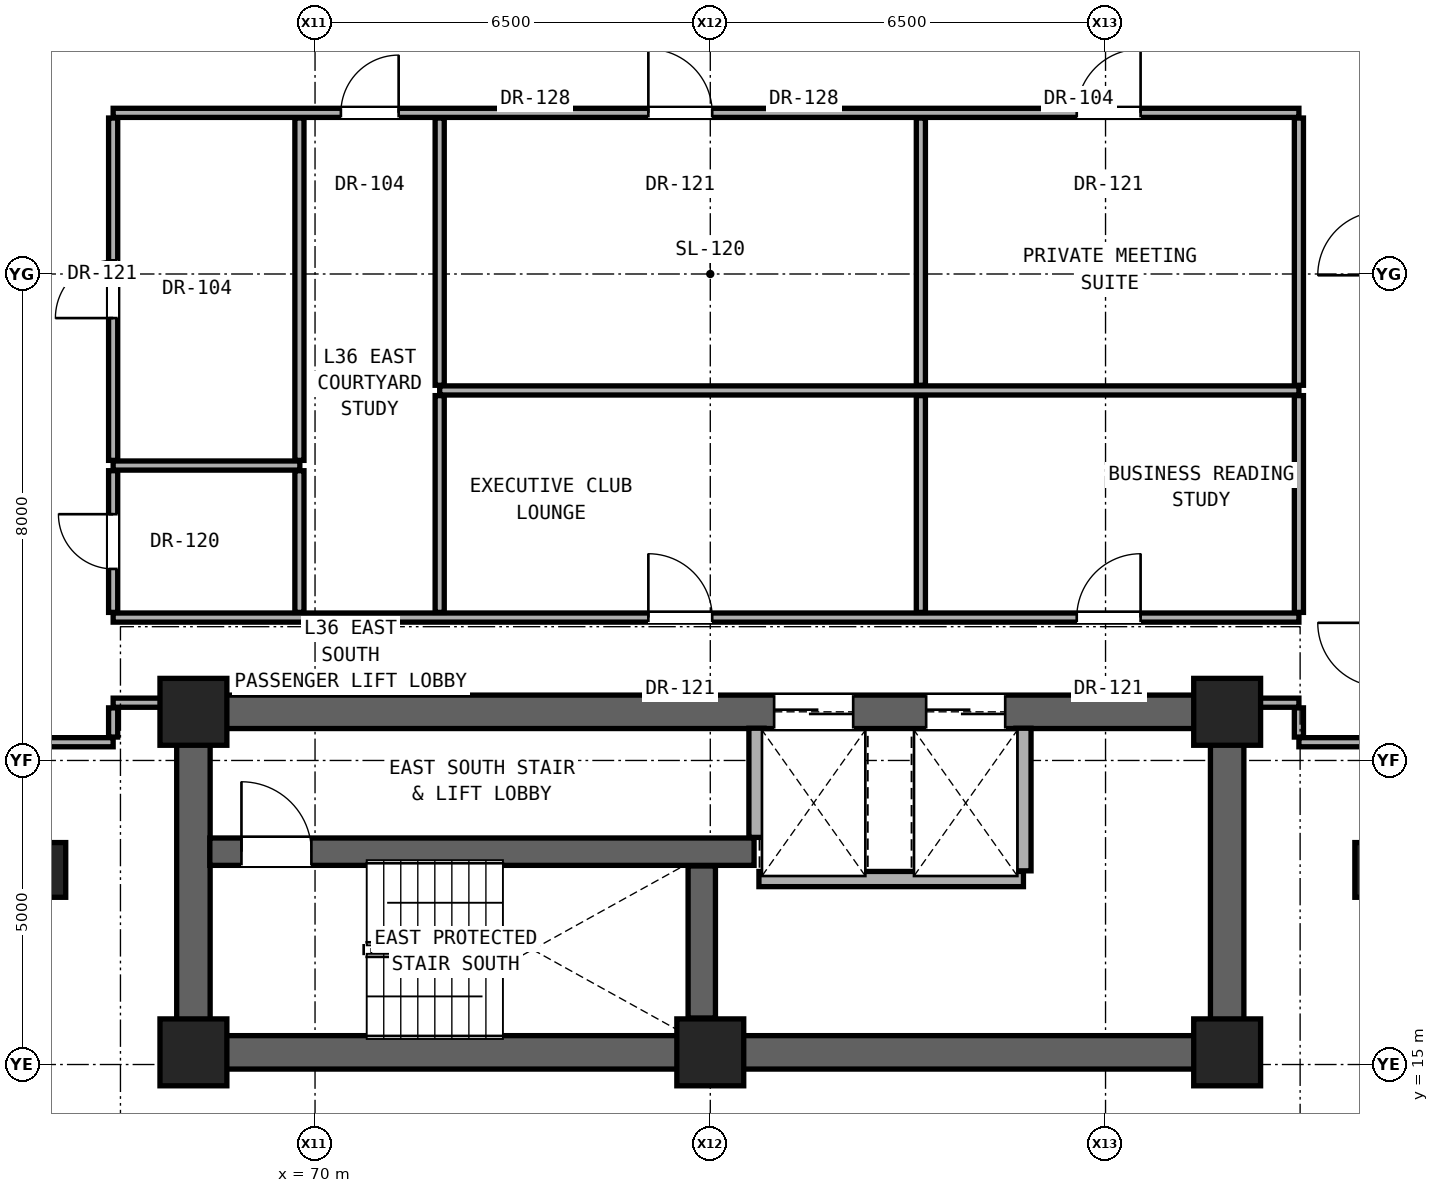
"""IFC4 building model, lengths in metres.
Left out: names, types, materials, properties, quantities, classifications, styles, units other than length and angle.
Written with IfcOpenShell. Run it as: python <this file> out.ifc"""

import sys

from ifc_helpers import new_model, si_unit, direction, frame, frame_2d, origin, origin_2d, place, context, subcontext, project, spatial, rectangle, extrude, element, fill, save


model = new_model("IFC4")
c1 = context("Model", 3, precision=1e-05, world=origin(), true_north=direction((0.0, 1.0)))
c2 = subcontext(c1, "Body", "Model", "MODEL_VIEW")
j1 = project(units=[si_unit("LENGTHUNIT", "METRE"), si_unit("PLANEANGLEUNIT", "RADIAN")], contexts=[c1])
p1 = place(None, origin())
s1 = spatial("IfcSite", under=j1, at=p1, CompositionType="ELEMENT")
p2 = place(p1, origin())
s2 = spatial("IfcBuilding", under=s1, at=p2, CompositionType="ELEMENT")
p3 = place(p2, frame((0.0, 0.0, 128.0)))
s3 = spatial("IfcBuildingStorey", under=s2, at=p3, CompositionType="ELEMENT", Elevation=128.0)
for number, where, z_axis, x_axis in (
    (1, (68.0, 15.2, 0.0), (0.0, 0.0, 1.0), (1.0, 0.0, 0.0)),
    (2, (76.5, 15.2, 0.0), (0.0, 0.0, 1.0), (1.0, 0.0, 0.0)),
    (3, (85.0, 15.2, 0.0), (0.0, 0.0, 1.0), (1.0, 0.0, 0.0)),
    (4, (68.0, 20.8, 0.0), (0.0, 0.0, 1.0), (1.0, 0.0, 0.0)),
    (5, (85.0, 20.8, 0.0), (0.0, 0.0, 1.0), (1.0, 0.0, 0.0)),
):
    element("IfcColumn", number, at=place(p3, frame(where, z_axis=z_axis, x_axis=x_axis)), inside=s3, PredefinedType="COLUMN", context=c2, shape_type="SweptSolid", body=[
        extrude(rectangle(XDim=1.1, YDim=1.1, at=origin_2d()), origin(), (0.0, 0.0, 1.0), 3.3),
    ])
for number, where, z_axis, x_axis in (
    (6, (65.6, 18.2, 0.0), (0.0, 0.0, 1.0), (1.0, 0.0, 0.0)),
    (7, (87.4, 18.2, 0.0), (0.0, 0.0, 1.0), (1.0, 0.0, 0.0)),
):
    element("IfcColumn", number, at=place(p3, frame(where, z_axis=z_axis, x_axis=x_axis)), inside=s3, PredefinedType="PILASTER", context=c2, shape_type="SweptSolid", body=[
        extrude(rectangle(XDim=0.6, YDim=0.9, at=origin_2d()), origin(), (0.0, 0.0, 1.0), 3.3),
    ])
p4 = place(p3, frame((68.0, 15.2, 0.0), z_axis=(0.0, 0.0, 1.0), x_axis=(1.0, 0.0, 0.0)))
e8 = element("IfcWall", 8, at=p4, inside=s3, PredefinedType="SHEAR", context=c2, shape_type="SweptSolid", body=[
    extrude(rectangle(XDim=17.0, YDim=0.55, at=frame_2d((8.5, 0.0))), origin(), (0.0, 0.0, 1.0), 3.08),
])
for number, where, z_axis, x_axis in (
    (9, (68.0, 15.2, 0.0), (0.0, 0.0, 1.0), (0.0, 1.0, 0.0)),
    (10, (85.0, 15.2, 0.0), (0.0, 0.0, 1.0), (0.0, 1.0, 0.0)),
):
    element("IfcWall", number, at=place(p3, frame(where, z_axis=z_axis, x_axis=x_axis)), inside=s3, PredefinedType="SHEAR", context=c2, shape_type="SweptSolid", body=[
        extrude(rectangle(XDim=5.6, YDim=0.55, at=frame_2d((2.8, 0.0))), origin(), (0.0, 0.0, 1.0), 3.08),
    ])
p5 = place(p3, frame((68.0, 20.8, 0.0), z_axis=(0.0, 0.0, 1.0), x_axis=(1.0, 0.0, 0.0)))
e11 = element("IfcWall", 11, at=p5, inside=s3, PredefinedType="SHEAR", context=c2, shape_type="SweptSolid", body=[
    extrude(rectangle(XDim=17.0, YDim=0.55, at=frame_2d((8.5, 0.0))), origin(), (0.0, 0.0, 1.0), 3.08),
])
p6 = place(p5, frame((9.55, 0.0, 0.0)))
e12 = element("IfcOpeningElement", 12, at=p6, cuts=e11, PredefinedType="OPENING", context=c2, shape_type="SweptSolid", body=[
    extrude(rectangle(XDim=1.3, YDim=2.3, at=frame_2d((0.65, 1.15))), frame((0.0, 0.285, 0.0), z_axis=(0.0, -1.0, 0.0), x_axis=(1.0, 0.0, 0.0)), (0.0, 0.0, 1.0), 0.57),
])
p7 = place(p5, frame((12.05, 0.0, 0.0)))
e13 = element("IfcOpeningElement", 13, at=p7, cuts=e11, PredefinedType="OPENING", context=c2, shape_type="SweptSolid", body=[
    extrude(rectangle(XDim=1.3, YDim=2.3, at=frame_2d((0.65, 1.15))), frame((0.0, 0.285, 0.0), z_axis=(0.0, -1.0, 0.0), x_axis=(1.0, 0.0, 0.0)), (0.0, 0.0, 1.0), 0.57),
])
p8 = place(p3, frame((77.3, 18.05, 0.0), z_axis=(0.0, 0.0, 1.0), x_axis=(1.0, 0.0, 0.0)))
e14 = element("IfcWall", 14, at=p8, inside=s3, PredefinedType="SOLIDWALL", context=c2, shape_type="SweptSolid", body=[
    extrude(rectangle(XDim=4.35, YDim=0.25, at=frame_2d((2.175, 0.0))), origin(), (0.0, 0.0, 1.0), 3.08),
])
p9 = place(p3, frame((68.27, 18.5, 0.0), z_axis=(0.0, 0.0, 1.0), x_axis=(1.0, 0.0, 0.0)))
e15 = element("IfcWall", 15, at=p9, inside=s3, PredefinedType="SHEAR", context=c2, shape_type="SweptSolid", body=[
    extrude(rectangle(XDim=8.95, YDim=0.45, at=frame_2d((4.475, 0.0))), origin(), (0.0, 0.0, 1.0), 3.08),
])
p10 = place(p9, frame((0.52, 0.0, 0.0)))
e16 = element("IfcOpeningElement", 16, at=p10, cuts=e15, PredefinedType="OPENING", context=c2, shape_type="SweptSolid", body=[
    extrude(rectangle(XDim=1.15, YDim=2.2, at=frame_2d((0.575, 1.1))), frame((0.0, 0.235, 0.0), z_axis=(0.0, -1.0, 0.0), x_axis=(1.0, 0.0, 0.0)), (0.0, 0.0, 1.0), 0.47),
])
p11 = place(p3, frame((65.32, 20.3, 0.0), z_axis=(0.0, 0.0, 1.0), x_axis=(1.0, 0.0, 0.0)))
e17 = element("IfcWall", 17, at=p11, inside=s3, PredefinedType="PARTITIONING", context=c2, shape_type="SweptSolid", body=[
    extrude(rectangle(XDim=1.36, YDim=0.15, at=frame_2d((0.68, 0.0))), origin(), (0.0, 0.0, 1.0), 3.08),
])
p12 = place(p3, frame((86.18, 20.3, 0.0), z_axis=(0.0, 0.0, 1.0), x_axis=(1.0, 0.0, 0.0)))
e18 = element("IfcWall", 18, at=p12, inside=s3, PredefinedType="PARTITIONING", context=c2, shape_type="SweptSolid", body=[
    extrude(rectangle(XDim=1.36, YDim=0.15, at=frame_2d((0.68, 0.0))), origin(), (0.0, 0.0, 1.0), 3.08),
])
p13 = place(p3, frame((66.68, 20.95, 0.0), z_axis=(0.0, 0.0, 1.0), x_axis=(1.0, 0.0, 0.0)))
e19 = element("IfcWall", 19, at=p13, inside=s3, PredefinedType="PARTITIONING", context=c2, shape_type="SweptSolid", body=[
    extrude(rectangle(XDim=1.05, YDim=0.15, at=frame_2d((0.525, 0.0))), origin(), (0.0, 0.0, 1.0), 2.472),
])
p14 = place(p3, frame((85.27, 20.95, 0.0), z_axis=(0.0, 0.0, 1.0), x_axis=(1.0, 0.0, 0.0)))
e20 = element("IfcWall", 20, at=p14, inside=s3, PredefinedType="PARTITIONING", context=c2, shape_type="SweptSolid", body=[
    extrude(rectangle(XDim=0.91, YDim=0.15, at=frame_2d((0.455, 0.0))), origin(), (0.0, 0.0, 1.0), 2.472),
])
p15 = place(p3, frame((66.68, 22.35, 0.0), z_axis=(0.0, 0.0, 1.0), x_axis=(1.0, 0.0, 0.0)))
e21 = element("IfcWall", 21, at=p15, inside=s3, PredefinedType="PARTITIONING", context=c2, shape_type="SweptSolid", body=[
    extrude(rectangle(XDim=19.5, YDim=0.15, at=frame_2d((9.75, 0.0))), origin(), (0.0, 0.0, 1.0), 2.216),
])
p16 = place(p15, frame((8.802, 0.0, 0.0)))
e22 = element("IfcOpeningElement", 22, at=p16, cuts=e21, PredefinedType="OPENING", context=c2, shape_type="SweptSolid", body=[
    extrude(rectangle(XDim=1.05, YDim=2.2, at=frame_2d((0.525, 1.1))), frame((0.0, 0.085, 0.0), z_axis=(0.0, -1.0, 0.0), x_axis=(1.0, 0.0, 0.0)), (0.0, 0.0, 1.0), 0.17),
])
p17 = place(p15, frame((15.846, 0.0, 0.0)))
e23 = element("IfcOpeningElement", 23, at=p17, cuts=e21, PredefinedType="OPENING", context=c2, shape_type="SweptSolid", body=[
    extrude(rectangle(XDim=1.05, YDim=2.2, at=frame_2d((0.525, 1.1))), frame((0.0, 0.085, 0.0), z_axis=(0.0, -1.0, 0.0), x_axis=(1.0, 0.0, 0.0)), (0.0, 0.0, 1.0), 0.17),
])
p18 = place(p3, frame((66.68, 24.85, 0.0), z_axis=(0.0, 0.0, 1.0), x_axis=(1.0, 0.0, 0.0)))
e24 = element("IfcWall", 24, at=p18, inside=s3, PredefinedType="PARTITIONING", context=c2, shape_type="SweptSolid", body=[
    extrude(rectangle(XDim=3.07, YDim=0.15, at=frame_2d((1.535, 0.0))), origin(), (0.0, 0.0, 1.0), 2.216),
])
p19 = place(p3, frame((72.05, 26.085, 0.0), z_axis=(0.0, 0.0, 1.0), x_axis=(1.0, 0.0, 0.0)))
e25 = element("IfcWall", 25, at=p19, inside=s3, PredefinedType="PARTITIONING", context=c2, shape_type="SweptSolid", body=[
    extrude(rectangle(XDim=14.13, YDim=0.15, at=frame_2d((7.065, 0.0))), origin(), (0.0, 0.0, 1.0), 2.216),
])
p20 = place(p3, frame((66.68, 30.65, 0.0), z_axis=(0.0, 0.0, 1.0), x_axis=(1.0, 0.0, 0.0)))
e26 = element("IfcWall", 26, at=p20, inside=s3, PredefinedType="PARTITIONING", context=c2, shape_type="SweptSolid", body=[
    extrude(rectangle(XDim=19.5, YDim=0.15, at=frame_2d((9.75, 0.0))), origin(), (0.0, 0.0, 1.0), 2.216),
])
p21 = place(p20, frame((3.745, 0.0, 0.0)))
e27 = element("IfcOpeningElement", 27, at=p21, cuts=e26, PredefinedType="OPENING", context=c2, shape_type="SweptSolid", body=[
    extrude(rectangle(XDim=0.95, YDim=2.15, at=frame_2d((0.475, 1.075))), frame((0.0, 0.085, 0.0), z_axis=(0.0, -1.0, 0.0), x_axis=(1.0, 0.0, 0.0)), (0.0, 0.0, 1.0), 0.17),
])
p22 = place(p20, frame((8.802, 0.0, 0.0)))
e28 = element("IfcOpeningElement", 28, at=p22, cuts=e26, PredefinedType="OPENING", context=c2, shape_type="SweptSolid", body=[
    extrude(rectangle(XDim=1.05, YDim=2.2, at=frame_2d((0.525, 1.1))), frame((0.0, 0.085, 0.0), z_axis=(0.0, -1.0, 0.0), x_axis=(1.0, 0.0, 0.0)), (0.0, 0.0, 1.0), 0.17),
])
p23 = place(p20, frame((15.846, 0.0, 0.0)))
e29 = element("IfcOpeningElement", 29, at=p23, cuts=e26, PredefinedType="OPENING", context=c2, shape_type="SweptSolid", body=[
    extrude(rectangle(XDim=1.05, YDim=2.2, at=frame_2d((0.525, 1.1))), frame((0.0, 0.085, 0.0), z_axis=(0.0, -1.0, 0.0), x_axis=(1.0, 0.0, 0.0)), (0.0, 0.0, 1.0), 0.17),
])
p24 = place(p3, frame((66.68, 20.385, 0.0), z_axis=(0.0, 0.0, 1.0), x_axis=(0.0, 1.0, 0.0)))
e30 = element("IfcWall", 30, at=p24, inside=s3, PredefinedType="PARTITIONING", context=c2, shape_type="SweptSolid", body=[
    extrude(rectangle(XDim=0.48, YDim=0.15, at=frame_2d((0.24, 0.0))), origin(), (0.0, 0.0, 1.0), 2.472),
])
p25 = place(p3, frame((66.68, 22.435, 0.0), z_axis=(0.0, 0.0, 1.0), x_axis=(0.0, 1.0, 0.0)))
e31 = element("IfcWall", 31, at=p25, inside=s3, PredefinedType="PARTITIONING", context=c2, shape_type="SweptSolid", body=[
    extrude(rectangle(XDim=2.33, YDim=0.15, at=frame_2d((1.165, 0.0))), origin(), (0.0, 0.0, 1.0), 3.08),
])
p26 = place(p25, frame((0.715, 0.0, 0.0)))
e32 = element("IfcOpeningElement", 32, at=p26, cuts=e31, PredefinedType="OPENING", context=c2, shape_type="SweptSolid", body=[
    extrude(rectangle(XDim=0.9, YDim=2.1, at=frame_2d((0.45, 1.05))), frame((0.0, 0.085, 0.0), z_axis=(0.0, -1.0, 0.0), x_axis=(1.0, 0.0, 0.0)), (0.0, 0.0, 1.0), 0.17),
])
p27 = place(p3, frame((66.68, 24.935, 0.0), z_axis=(0.0, 0.0, 1.0), x_axis=(0.0, 1.0, 0.0)))
e33 = element("IfcWall", 33, at=p27, inside=s3, PredefinedType="PARTITIONING", context=c2, shape_type="SweptSolid", body=[
    extrude(rectangle(XDim=5.63, YDim=0.15, at=frame_2d((2.815, 0.0))), origin(), (0.0, 0.0, 1.0), 2.376),
])
p28 = place(p27, frame((2.34, 0.0, 0.0)))
e34 = element("IfcOpeningElement", 34, at=p28, cuts=e33, PredefinedType="OPENING", context=c2, shape_type="SweptSolid", body=[
    extrude(rectangle(XDim=0.95, YDim=2.15, at=frame_2d((0.475, 1.075))), frame((0.0, 0.085, 0.0), z_axis=(0.0, -1.0, 0.0), x_axis=(1.0, 0.0, 0.0)), (0.0, 0.0, 1.0), 0.17),
])
p29 = place(p3, frame((69.743, 22.435, 0.0), z_axis=(0.0, 0.0, 1.0), x_axis=(0.0, 1.0, 0.0)))
e35 = element("IfcWall", 35, at=p29, inside=s3, PredefinedType="PARTITIONING", context=c2, shape_type="SweptSolid", body=[
    extrude(rectangle(XDim=2.33, YDim=0.15, at=frame_2d((1.165, 0.0))), origin(), (0.0, 0.0, 1.0), 3.08),
])
p30 = place(p3, frame((69.743, 24.935, 0.0), z_axis=(0.0, 0.0, 1.0), x_axis=(0.0, 1.0, 0.0)))
e36 = element("IfcWall", 36, at=p30, inside=s3, PredefinedType="PARTITIONING", context=c2, shape_type="SweptSolid", body=[
    extrude(rectangle(XDim=5.63, YDim=0.15, at=frame_2d((2.815, 0.0))), origin(), (0.0, 0.0, 1.0), 2.216),
])
p31 = place(p3, frame((72.05, 22.435, 0.0), z_axis=(0.0, 0.0, 1.0), x_axis=(0.0, 1.0, 0.0)))
e37 = element("IfcWall", 37, at=p31, inside=s3, PredefinedType="PARTITIONING", context=c2, shape_type="SweptSolid", body=[
    extrude(rectangle(XDim=3.565, YDim=0.15, at=frame_2d((1.782, 0.0))), origin(), (0.0, 0.0, 1.0), 3.08),
])
p32 = place(p3, frame((72.05, 26.17, 0.0), z_axis=(0.0, 0.0, 1.0), x_axis=(0.0, 1.0, 0.0)))
e38 = element("IfcWall", 38, at=p32, inside=s3, PredefinedType="PARTITIONING", context=c2, shape_type="SweptSolid", body=[
    extrude(rectangle(XDim=4.395, YDim=0.15, at=frame_2d((2.198, 0.0))), origin(), (0.0, 0.0, 1.0), 2.216),
])
p33 = place(p3, frame((76.36, 15.765, 0.0), z_axis=(0.0, 0.0, 1.0), x_axis=(0.0, 1.0, 0.0)))
e39 = element("IfcWall", 39, at=p33, inside=s3, PredefinedType="SHEAR", context=c2, shape_type="SweptSolid", body=[
    extrude(rectangle(XDim=2.5, YDim=0.45, at=frame_2d((1.25, 0.0))), origin(), (0.0, 0.0, 1.0), 3.08),
])
p34 = place(p3, frame((77.26, 18.735, 0.0), z_axis=(0.0, 0.0, 1.0), x_axis=(0.0, 1.0, 0.0)))
e40 = element("IfcWall", 40, at=p34, inside=s3, PredefinedType="SOLIDWALL", context=c2, shape_type="SweptSolid", body=[
    extrude(rectangle(XDim=1.795, YDim=0.25, at=frame_2d((0.897, 0.0))), origin(), (0.0, 0.0, 1.0), 3.08),
])
p35 = place(p3, frame((79.963, 22.435, 0.0), z_axis=(0.0, 0.0, 1.0), x_axis=(0.0, 1.0, 0.0)))
e41 = element("IfcWall", 41, at=p35, inside=s3, PredefinedType="PARTITIONING", context=c2, shape_type="SweptSolid", body=[
    extrude(rectangle(XDim=3.565, YDim=0.15, at=frame_2d((1.782, 0.0))), origin(), (0.0, 0.0, 1.0), 3.08),
])
p36 = place(p3, frame((79.963, 26.17, 0.0), z_axis=(0.0, 0.0, 1.0), x_axis=(0.0, 1.0, 0.0)))
e42 = element("IfcWall", 42, at=p36, inside=s3, PredefinedType="PARTITIONING", context=c2, shape_type="SweptSolid", body=[
    extrude(rectangle(XDim=4.395, YDim=0.15, at=frame_2d((2.198, 0.0))), origin(), (0.0, 0.0, 1.0), 2.216),
])
p37 = place(p3, frame((81.65, 18.185, 0.0), z_axis=(0.0, 0.0, 1.0), x_axis=(0.0, 1.0, 0.0)))
e43 = element("IfcWall", 43, at=p37, inside=s3, PredefinedType="SOLIDWALL", context=c2, shape_type="SweptSolid", body=[
    extrude(rectangle(XDim=2.345, YDim=0.25, at=frame_2d((1.172, 0.0))), origin(), (0.0, 0.0, 1.0), 3.08),
])
p38 = place(p3, frame((86.18, 20.385, 0.0), z_axis=(0.0, 0.0, 1.0), x_axis=(0.0, 1.0, 0.0)))
e44 = element("IfcWall", 44, at=p38, inside=s3, PredefinedType="PARTITIONING", context=c2, shape_type="SweptSolid", body=[
    extrude(rectangle(XDim=0.48, YDim=0.15, at=frame_2d((0.24, 0.0))), origin(), (0.0, 0.0, 1.0), 2.472),
])
p39 = place(p3, frame((86.18, 22.435, 0.0), z_axis=(0.0, 0.0, 1.0), x_axis=(0.0, 1.0, 0.0)))
e45 = element("IfcWall", 45, at=p39, inside=s3, PredefinedType="PARTITIONING", context=c2, shape_type="SweptSolid", body=[
    extrude(rectangle(XDim=3.565, YDim=0.15, at=frame_2d((1.782, 0.0))), origin(), (0.0, 0.0, 1.0), 3.08),
])
p40 = place(p3, frame((86.18, 26.17, 0.0), z_axis=(0.0, 0.0, 1.0), x_axis=(0.0, 1.0, 0.0)))
e46 = element("IfcWall", 46, at=p40, inside=s3, PredefinedType="PARTITIONING", context=c2, shape_type="SweptSolid", body=[
    extrude(rectangle(XDim=4.395, YDim=0.15, at=frame_2d((2.198, 0.0))), origin(), (0.0, 0.0, 1.0), 2.376),
])
p41 = place(p10, origin())
e47 = element("IfcDoor", 47, at=p41, inside=s3, OperationType="SINGLE_SWING_LEFT", PredefinedType="DOOR", context=c2, shape_type="SweptSolid", body=[
    extrude(rectangle(XDim=1.15, YDim=2.2, at=frame_2d((0.575, 1.1))), frame((0.0, 0.025, 0.0), z_axis=(0.0, -1.0, 0.0), x_axis=(1.0, 0.0, 0.0)), (0.0, 0.0, 1.0), 0.05),
])
fill(e16, e47)
p42 = place(p26, origin())
e48 = element("IfcDoor", 48, at=p42, inside=s3, OperationType="SINGLE_SWING_RIGHT", PredefinedType="DOOR", context=c2, shape_type="SweptSolid", body=[
    extrude(rectangle(XDim=0.9, YDim=2.1, at=frame_2d((0.45, 1.05))), frame((0.0, 0.025, 0.0), z_axis=(0.0, -1.0, 0.0), x_axis=(1.0, 0.0, 0.0)), (0.0, 0.0, 1.0), 0.05),
])
fill(e32, e48)
p43 = place(p28, origin())
e49 = element("IfcDoor", 49, at=p43, inside=s3, OperationType="SINGLE_SWING_LEFT", PredefinedType="DOOR", context=c2, shape_type="SweptSolid", body=[
    extrude(rectangle(XDim=0.95, YDim=2.15, at=frame_2d((0.475, 1.075))), frame((0.0, 0.025, 0.0), z_axis=(0.0, -1.0, 0.0), x_axis=(1.0, 0.0, 0.0)), (0.0, 0.0, 1.0), 0.05),
])
fill(e34, e49)
p44 = place(p21, origin())
e50 = element("IfcDoor", 50, at=p44, inside=s3, OperationType="SINGLE_SWING_RIGHT", PredefinedType="DOOR", context=c2, shape_type="SweptSolid", body=[
    extrude(rectangle(XDim=0.95, YDim=2.15, at=frame_2d((0.475, 1.075))), frame((0.0, 0.025, 0.0), z_axis=(0.0, -1.0, 0.0), x_axis=(1.0, 0.0, 0.0)), (0.0, 0.0, 1.0), 0.05),
])
fill(e27, e50)
p45 = place(p16, origin())
e51 = element("IfcDoor", 51, at=p45, inside=s3, OperationType="SINGLE_SWING_LEFT", PredefinedType="DOOR", context=c2, shape_type="SweptSolid", body=[
    extrude(rectangle(XDim=1.05, YDim=2.2, at=frame_2d((0.525, 1.1))), frame((0.0, 0.025, 0.0), z_axis=(0.0, -1.0, 0.0), x_axis=(1.0, 0.0, 0.0)), (0.0, 0.0, 1.0), 0.05),
])
fill(e22, e51)
p46 = place(p17, origin())
e52 = element("IfcDoor", 52, at=p46, inside=s3, OperationType="SINGLE_SWING_RIGHT", PredefinedType="DOOR", context=c2, shape_type="SweptSolid", body=[
    extrude(rectangle(XDim=1.05, YDim=2.2, at=frame_2d((0.525, 1.1))), frame((0.0, 0.025, 0.0), z_axis=(0.0, -1.0, 0.0), x_axis=(1.0, 0.0, 0.0)), (0.0, 0.0, 1.0), 0.05),
])
fill(e23, e52)
p47 = place(p22, origin())
e53 = element("IfcDoor", 53, at=p47, inside=s3, OperationType="SINGLE_SWING_LEFT", PredefinedType="DOOR", context=c2, shape_type="SweptSolid", body=[
    extrude(rectangle(XDim=1.05, YDim=2.2, at=frame_2d((0.525, 1.1))), frame((0.0, 0.025, 0.0), z_axis=(0.0, -1.0, 0.0), x_axis=(1.0, 0.0, 0.0)), (0.0, 0.0, 1.0), 0.05),
])
fill(e28, e53)
p48 = place(p23, origin())
e54 = element("IfcDoor", 54, at=p48, inside=s3, OperationType="SINGLE_SWING_RIGHT", PredefinedType="DOOR", context=c2, shape_type="SweptSolid", body=[
    extrude(rectangle(XDim=1.05, YDim=2.2, at=frame_2d((0.525, 1.1))), frame((0.0, 0.025, 0.0), z_axis=(0.0, -1.0, 0.0), x_axis=(1.0, 0.0, 0.0)), (0.0, 0.0, 1.0), 0.05),
])
fill(e29, e54)
p49 = place(p6, origin())
e55 = element("IfcDoor", 55, at=p49, inside=s3, OperationType="DOUBLE_DOOR_SLIDING", PredefinedType="DOOR", context=c2, shape_type="SweptSolid", body=[
    extrude(rectangle(XDim=1.3, YDim=2.3, at=frame_2d((0.65, 1.15))), frame((0.0, 0.025, 0.0), z_axis=(0.0, -1.0, 0.0), x_axis=(1.0, 0.0, 0.0)), (0.0, 0.0, 1.0), 0.05),
])
fill(e12, e55)
p50 = place(p7, origin())
e56 = element("IfcDoor", 56, at=p50, inside=s3, OperationType="DOUBLE_DOOR_SLIDING", PredefinedType="DOOR", context=c2, shape_type="SweptSolid", body=[
    extrude(rectangle(XDim=1.3, YDim=2.3, at=frame_2d((0.65, 1.15))), frame((0.0, 0.025, 0.0), z_axis=(0.0, -1.0, 0.0), x_axis=(1.0, 0.0, 0.0)), (0.0, 0.0, 1.0), 0.05),
])
fill(e13, e56)
save(model, sys.argv[1])
